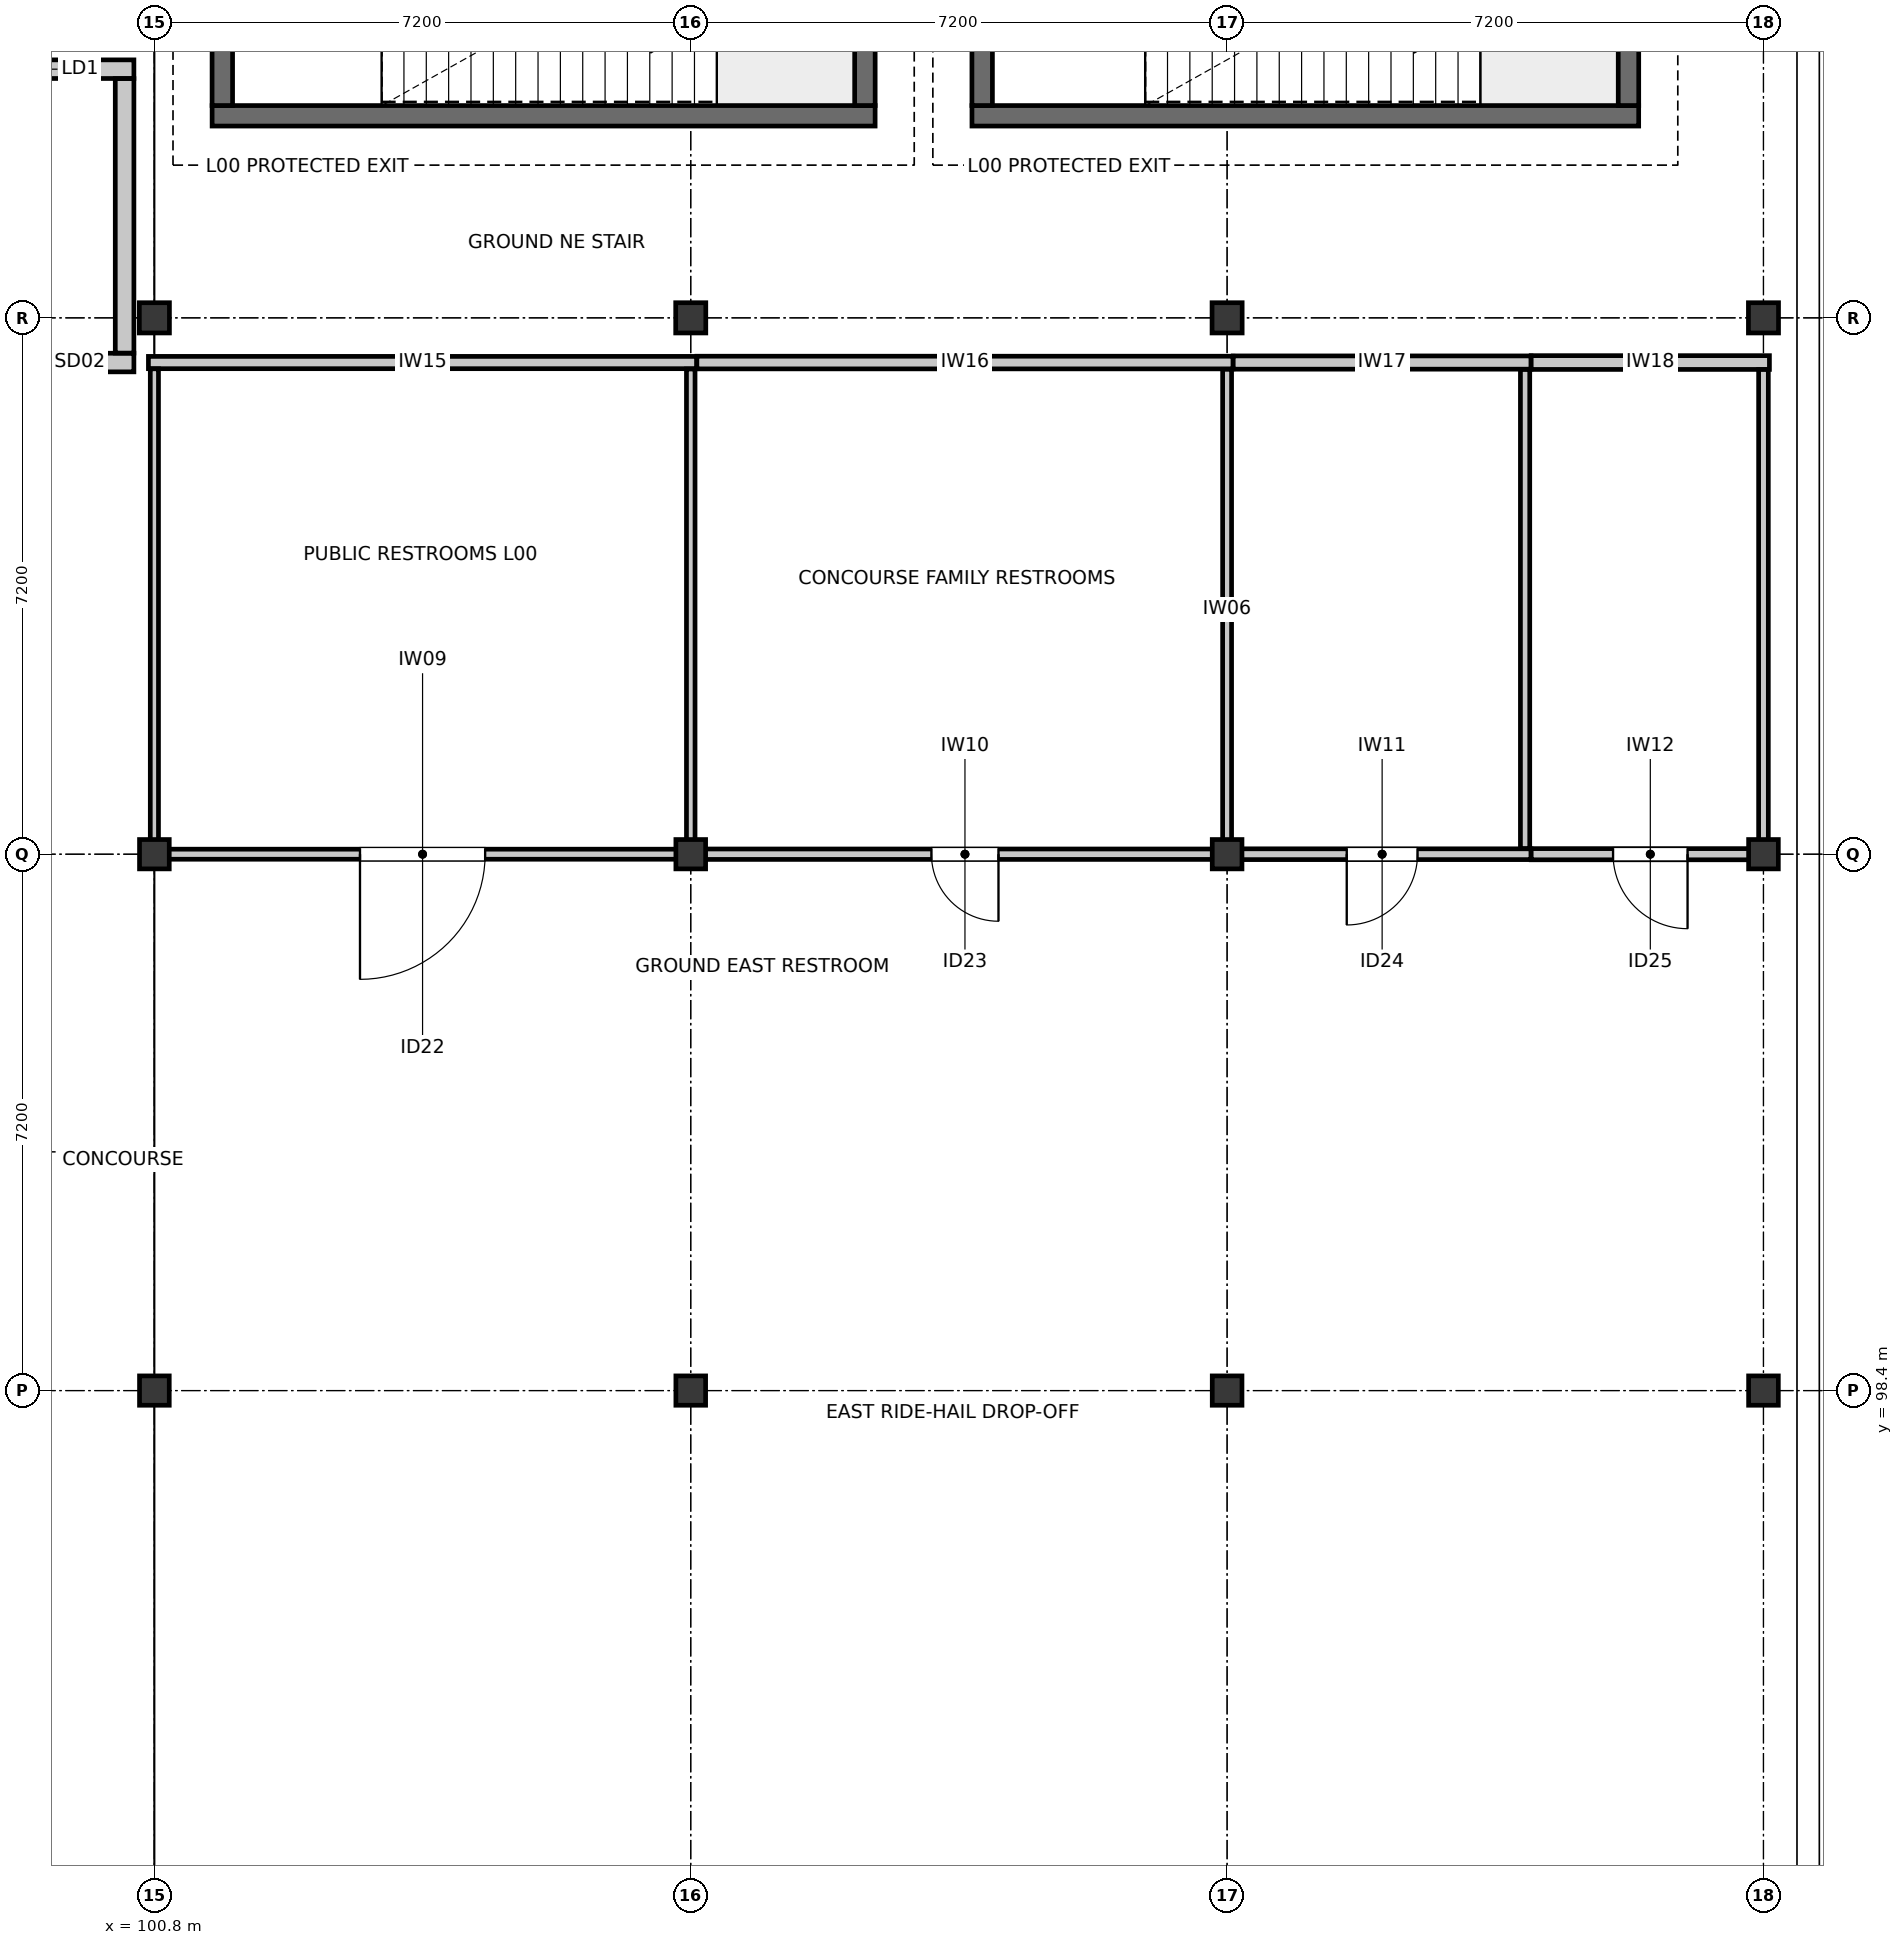
"""IFC4 building model, lengths in metres.
Left out: names, types, materials, properties, quantities, classifications, styles, units other than length and angle.
Written with IfcOpenShell. Run it as: python <this file> out.ifc"""

import sys

from ifc_helpers import new_model, si_unit, direction, frame, frame_2d, origin, origin_2d, place, context, subcontext, project, spatial, rectangle, i_section, extrude, element, fill, save


model = new_model("IFC4")
c1 = context("Model", 3, precision=1e-05, world=origin(), true_north=direction((0.0, 1.0)))
c2 = subcontext(c1, "Body", "Model", "MODEL_VIEW")
j1 = project(units=[si_unit("LENGTHUNIT", "METRE"), si_unit("PLANEANGLEUNIT", "RADIAN")], contexts=[c1])
p1 = place(None, origin())
s1 = spatial("IfcSite", under=j1, at=p1, CompositionType="ELEMENT")
p2 = place(p1, origin())
s2 = spatial("IfcBuilding", under=s1, at=p2, CompositionType="ELEMENT")
p3 = place(p2, origin())
s3 = spatial("IfcBuildingStorey", under=s2, at=p3, CompositionType="ELEMENT", Elevation=0.0)
for number, where, z_axis, x_axis in (
    (1, (100.8, 98.4, 0.0), (0.0, 0.0, 1.0), (1.0, 0.0, 0.0)),
    (2, (100.8, 105.6, 0.0), (0.0, 0.0, 1.0), (1.0, 0.0, 0.0)),
):
    element("IfcColumn", number, at=place(p3, frame(where, z_axis=z_axis, x_axis=x_axis)), inside=s3, PredefinedType="COLUMN", context=c2, shape_type="SweptSolid", body=[
        extrude(i_section(OverallWidth=0.399, OverallDepth=0.394, WebThickness=0.023, FlangeThickness=0.037, FilletRadius=0.015, at=origin_2d()), origin(), (0.0, 0.0, 1.0), 5.4),
    ])
p4 = place(p3, frame((100.8, 112.8, 0.0), z_axis=(0.0, 0.0, 1.0), x_axis=(1.0, 0.0, 0.0)))
e3 = element("IfcColumn", 3, at=p4, inside=s3, PredefinedType="COLUMN", context=c2, shape_type="SweptSolid", body=[
    extrude(i_section(OverallWidth=0.404, OverallDepth=0.406, WebThickness=0.027, FlangeThickness=0.044, FilletRadius=0.015, at=origin_2d()), origin(), (0.0, 0.0, 1.0), 5.4),
])
for number, where, z_axis, x_axis in (
    (4, (108.0, 98.4, 0.0), (0.0, 0.0, 1.0), (1.0, 0.0, 0.0)),
    (5, (108.0, 105.6, 0.0), (0.0, 0.0, 1.0), (1.0, 0.0, 0.0)),
):
    element("IfcColumn", number, at=place(p3, frame(where, z_axis=z_axis, x_axis=x_axis)), inside=s3, PredefinedType="COLUMN", context=c2, shape_type="SweptSolid", body=[
        extrude(i_section(OverallWidth=0.399, OverallDepth=0.394, WebThickness=0.023, FlangeThickness=0.037, FilletRadius=0.015, at=origin_2d()), origin(), (0.0, 0.0, 1.0), 5.4),
    ])
p5 = place(p3, frame((108.0, 112.8, 0.0), z_axis=(0.0, 0.0, 1.0), x_axis=(1.0, 0.0, 0.0)))
e6 = element("IfcColumn", 6, at=p5, inside=s3, PredefinedType="COLUMN", context=c2, shape_type="SweptSolid", body=[
    extrude(i_section(OverallWidth=0.404, OverallDepth=0.406, WebThickness=0.027, FlangeThickness=0.044, FilletRadius=0.015, at=origin_2d()), origin(), (0.0, 0.0, 1.0), 5.4),
])
for number, where, z_axis, x_axis in (
    (7, (115.2, 98.4, 0.0), (0.0, 0.0, 1.0), (1.0, 0.0, 0.0)),
    (8, (115.2, 105.6, 0.0), (0.0, 0.0, 1.0), (1.0, 0.0, 0.0)),
):
    element("IfcColumn", number, at=place(p3, frame(where, z_axis=z_axis, x_axis=x_axis)), inside=s3, PredefinedType="COLUMN", context=c2, shape_type="SweptSolid", body=[
        extrude(i_section(OverallWidth=0.399, OverallDepth=0.394, WebThickness=0.023, FlangeThickness=0.037, FilletRadius=0.015, at=origin_2d()), origin(), (0.0, 0.0, 1.0), 5.4),
    ])
p6 = place(p3, frame((115.2, 112.8, 0.0), z_axis=(0.0, 0.0, 1.0), x_axis=(1.0, 0.0, 0.0)))
e9 = element("IfcColumn", 9, at=p6, inside=s3, PredefinedType="COLUMN", context=c2, shape_type="SweptSolid", body=[
    extrude(i_section(OverallWidth=0.404, OverallDepth=0.406, WebThickness=0.027, FlangeThickness=0.044, FilletRadius=0.015, at=origin_2d()), origin(), (0.0, 0.0, 1.0), 5.4),
])
for number, where, z_axis, x_axis in (
    (10, (122.4, 98.4, 0.0), (0.0, 0.0, 1.0), (1.0, 0.0, 0.0)),
    (11, (122.4, 105.6, 0.0), (0.0, 0.0, 1.0), (1.0, 0.0, 0.0)),
):
    element("IfcColumn", number, at=place(p3, frame(where, z_axis=z_axis, x_axis=x_axis)), inside=s3, PredefinedType="COLUMN", context=c2, shape_type="SweptSolid", body=[
        extrude(i_section(OverallWidth=0.399, OverallDepth=0.394, WebThickness=0.023, FlangeThickness=0.037, FilletRadius=0.015, at=origin_2d()), origin(), (0.0, 0.0, 1.0), 5.4),
    ])
p7 = place(p3, frame((122.4, 112.8, 0.0), z_axis=(0.0, 0.0, 1.0), x_axis=(1.0, 0.0, 0.0)))
e12 = element("IfcColumn", 12, at=p7, inside=s3, PredefinedType="COLUMN", context=c2, shape_type="SweptSolid", body=[
    extrude(i_section(OverallWidth=0.404, OverallDepth=0.406, WebThickness=0.027, FlangeThickness=0.044, FilletRadius=0.015, at=origin_2d()), origin(), (0.0, 0.0, 1.0), 5.4),
])
p8 = place(p3, frame((110.475, 115.512, 0.0), z_axis=(0.0, 0.0, 1.0), x_axis=(-1.0, 0.0, 0.0)))
e13 = element("IfcWall", 13, at=p8, inside=s3, PredefinedType="SOLIDWALL", context=c2, shape_type="SweptSolid", body=[
    extrude(rectangle(XDim=8.9, YDim=0.275, at=frame_2d((4.45, 0.0))), origin(), (0.0, 0.0, 1.0), 5.16),
])
p9 = place(p3, frame((101.712, 115.65, 0.0), z_axis=(0.0, 0.0, 1.0), x_axis=(0.0, 1.0, 0.0)))
e14 = element("IfcWall", 14, at=p9, inside=s3, PredefinedType="SOLIDWALL", context=c2, shape_type="SweptSolid", body=[
    extrude(rectangle(XDim=3.56, YDim=0.275, at=frame_2d((1.78, 0.0))), origin(), (0.0, 0.0, 1.0), 5.16),
])
p10 = place(p9, frame((1.155, 0.0, 0.0)))
e15 = element("IfcOpeningElement", 15, at=p10, cuts=e14, PredefinedType="OPENING", context=c2, shape_type="SweptSolid", body=[
    extrude(rectangle(XDim=1.25, YDim=2.2, at=frame_2d((0.625, 1.1))), frame((0.0, 0.147, 0.0), z_axis=(0.0, -1.0, 0.0), x_axis=(1.0, 0.0, 0.0)), (0.0, 0.0, 1.0), 0.295),
])
p11 = place(p3, frame((110.338, 119.21, 0.0), z_axis=(0.0, 0.0, 1.0), x_axis=(0.0, -1.0, 0.0)))
e16 = element("IfcWall", 16, at=p11, inside=s3, PredefinedType="SOLIDWALL", context=c2, shape_type="SweptSolid", body=[
    extrude(rectangle(XDim=3.56, YDim=0.275, at=frame_2d((1.78, 0.0))), origin(), (0.0, 0.0, 1.0), 5.16),
])
p12 = place(p3, frame((120.725, 115.512, 0.0), z_axis=(0.0, 0.0, 1.0), x_axis=(-1.0, 0.0, 0.0)))
e17 = element("IfcWall", 17, at=p12, inside=s3, PredefinedType="SOLIDWALL", context=c2, shape_type="SweptSolid", body=[
    extrude(rectangle(XDim=8.95, YDim=0.275, at=frame_2d((4.475, 0.0))), origin(), (0.0, 0.0, 1.0), 5.16),
])
p13 = place(p3, frame((111.912, 115.65, 0.0), z_axis=(0.0, 0.0, 1.0), x_axis=(0.0, 1.0, 0.0)))
e18 = element("IfcWall", 18, at=p13, inside=s3, PredefinedType="SOLIDWALL", context=c2, shape_type="SweptSolid", body=[
    extrude(rectangle(XDim=3.56, YDim=0.275, at=frame_2d((1.78, 0.0))), origin(), (0.0, 0.0, 1.0), 5.16),
])
p14 = place(p13, frame((1.18, 0.0, 0.0)))
e19 = element("IfcOpeningElement", 19, at=p14, cuts=e18, PredefinedType="OPENING", context=c2, shape_type="SweptSolid", body=[
    extrude(rectangle(XDim=1.2, YDim=2.2, at=frame_2d((0.6, 1.1))), frame((0.0, 0.147, 0.0), z_axis=(0.0, -1.0, 0.0), x_axis=(1.0, 0.0, 0.0)), (0.0, 0.0, 1.0), 0.295),
])
p15 = place(p3, frame((120.588, 119.21, 0.0), z_axis=(0.0, 0.0, 1.0), x_axis=(0.0, -1.0, 0.0)))
e20 = element("IfcWall", 20, at=p15, inside=s3, PredefinedType="SOLIDWALL", context=c2, shape_type="SweptSolid", body=[
    extrude(rectangle(XDim=3.56, YDim=0.275, at=frame_2d((1.78, 0.0))), origin(), (0.0, 0.0, 1.0), 5.16),
])
p16 = place(p3, frame((100.525, 112.2, 0.0), z_axis=(0.0, 0.0, 1.0), x_axis=(-1.0, 0.0, 0.0)))
e21 = element("IfcWall", 21, at=p16, inside=s3, PredefinedType="PARTITIONING", context=c2, shape_type="SweptSolid", body=[
    extrude(rectangle(XDim=6.65, YDim=0.25, at=frame_2d((3.325, 0.0))), origin(), (0.0, 0.0, 1.0), 4.457),
])
p17 = place(p16, frame((2.7, 0.0, 0.0)))
e22 = element("IfcOpeningElement", 22, at=p17, cuts=e21, PredefinedType="OPENING", context=c2, shape_type="SweptSolid", body=[
    extrude(rectangle(XDim=1.25, YDim=2.2, at=frame_2d((0.625, 1.1))), frame((0.0, 0.135, 0.0), z_axis=(0.0, -1.0, 0.0), x_axis=(1.0, 0.0, 0.0)), (0.0, 0.0, 1.0), 0.27),
])
p18 = place(p3, frame((98.827, 116.138, 0.0), z_axis=(0.0, 0.0, 1.0), x_axis=(1.0, 0.0, 0.0)))
e23 = element("IfcWall", 23, at=p18, inside=s3, PredefinedType="PARTITIONING", context=c2, shape_type="SweptSolid", body=[
    extrude(rectangle(XDim=1.698, YDim=0.25, at=frame_2d((0.849, 0.0))), origin(), (0.0, 0.0, 1.0), 4.457),
])
p19 = place(p3, frame((100.4, 116.011, 0.0), z_axis=(0.0, 0.0, 1.0), x_axis=(0.0, -1.0, 0.0)))
e24 = element("IfcWall", 24, at=p19, inside=s3, PredefinedType="PARTITIONING", context=c2, shape_type="SweptSolid", body=[
    extrude(rectangle(XDim=3.684, YDim=0.25, at=frame_2d((1.842, 0.0))), origin(), (0.0, 0.0, 1.0), 4.457),
])
p20 = place(p3, frame((108.08, 105.6, 0.0), z_axis=(0.0, 0.0, 1.0), x_axis=(-1.0, 0.0, 0.0)))
e25 = element("IfcWall", 25, at=p20, inside=s3, PredefinedType="PARTITIONING", context=c2, shape_type="SweptSolid", body=[
    extrude(rectangle(XDim=7.36, YDim=0.135, at=frame_2d((3.68, 0.0))), origin(), (0.0, 0.0, 1.0), 4.457),
])
p21 = place(p20, frame((2.84, 0.0, 0.0)))
e26 = element("IfcOpeningElement", 26, at=p21, cuts=e25, PredefinedType="OPENING", context=c2, shape_type="SweptSolid", body=[
    extrude(rectangle(XDim=1.68, YDim=2.16, at=frame_2d((0.84, 1.08))), frame((0.0, 0.077, 0.0), z_axis=(0.0, -1.0, 0.0), x_axis=(1.0, 0.0, 0.0)), (0.0, 0.0, 1.0), 0.155),
])
p22 = place(p3, frame((115.28, 105.6, 0.0), z_axis=(0.0, 0.0, 1.0), x_axis=(-1.0, 0.0, 0.0)))
e27 = element("IfcWall", 27, at=p22, inside=s3, PredefinedType="PARTITIONING", context=c2, shape_type="SweptSolid", body=[
    extrude(rectangle(XDim=7.198, YDim=0.14, at=frame_2d((3.599, 0.0))), origin(), (0.0, 0.0, 1.0), 4.457),
])
p23 = place(p22, frame((3.149, 0.0, 0.0)))
e28 = element("IfcOpeningElement", 28, at=p23, cuts=e27, PredefinedType="OPENING", context=c2, shape_type="SweptSolid", body=[
    extrude(rectangle(XDim=0.9, YDim=2.22, at=frame_2d((0.45, 1.11))), frame((0.0, 0.08, 0.0), z_axis=(0.0, -1.0, 0.0), x_axis=(1.0, 0.0, 0.0)), (0.0, 0.0, 1.0), 0.16),
])
p24 = place(p3, frame((119.28, 105.6, 0.0), z_axis=(0.0, 0.0, 1.0), x_axis=(-1.0, 0.0, 0.0)))
e29 = element("IfcWall", 29, at=p24, inside=s3, PredefinedType="PARTITIONING", context=c2, shape_type="SweptSolid", body=[
    extrude(rectangle(XDim=3.998, YDim=0.145, at=frame_2d((1.999, 0.0))), origin(), (0.0, 0.0, 1.0), 4.457),
])
p25 = place(p24, frame((1.524, 0.0, 0.0)))
e30 = element("IfcOpeningElement", 30, at=p25, cuts=e29, PredefinedType="OPENING", context=c2, shape_type="SweptSolid", body=[
    extrude(rectangle(XDim=0.95, YDim=2.22, at=frame_2d((0.475, 1.11))), frame((0.0, 0.083, 0.0), z_axis=(0.0, -1.0, 0.0), x_axis=(1.0, 0.0, 0.0)), (0.0, 0.0, 1.0), 0.165),
])
p26 = place(p3, frame((122.48, 105.6, 0.0), z_axis=(0.0, 0.0, 1.0), x_axis=(-1.0, 0.0, 0.0)))
e31 = element("IfcWall", 31, at=p26, inside=s3, PredefinedType="PARTITIONING", context=c2, shape_type="SweptSolid", body=[
    extrude(rectangle(XDim=3.198, YDim=0.15, at=frame_2d((1.599, 0.0))), origin(), (0.0, 0.0, 1.0), 4.457),
])
p27 = place(p26, frame((1.099, 0.0, 0.0)))
e32 = element("IfcOpeningElement", 32, at=p27, cuts=e31, PredefinedType="OPENING", context=c2, shape_type="SweptSolid", body=[
    extrude(rectangle(XDim=1.0, YDim=2.22, at=frame_2d((0.5, 1.11))), frame((0.0, 0.085, 0.0), z_axis=(0.0, -1.0, 0.0), x_axis=(1.0, 0.0, 0.0)), (0.0, 0.0, 1.0), 0.17),
])
p28 = place(p3, frame((100.72, 112.2, 0.0), z_axis=(0.0, 0.0, 1.0), x_axis=(1.0, 0.0, 0.0)))
e33 = element("IfcWall", 33, at=p28, inside=s3, PredefinedType="PARTITIONING", context=c2, shape_type="SweptSolid", body=[
    extrude(rectangle(XDim=7.36, YDim=0.165, at=frame_2d((3.68, 0.0))), origin(), (0.0, 0.0, 1.0), 4.457),
])
p29 = place(p3, frame((108.082, 112.2, 0.0), z_axis=(0.0, 0.0, 1.0), x_axis=(1.0, 0.0, 0.0)))
e34 = element("IfcWall", 34, at=p29, inside=s3, PredefinedType="PARTITIONING", context=c2, shape_type="SweptSolid", body=[
    extrude(rectangle(XDim=7.198, YDim=0.17, at=frame_2d((3.599, 0.0))), origin(), (0.0, 0.0, 1.0), 4.457),
])
p30 = place(p3, frame((115.282, 112.2, 0.0), z_axis=(0.0, 0.0, 1.0), x_axis=(1.0, 0.0, 0.0)))
e35 = element("IfcWall", 35, at=p30, inside=s3, PredefinedType="PARTITIONING", context=c2, shape_type="SweptSolid", body=[
    extrude(rectangle(XDim=3.998, YDim=0.178, at=frame_2d((1.999, 0.0))), origin(), (0.0, 0.0, 1.0), 4.457),
])
p31 = place(p3, frame((119.282, 112.2, 0.0), z_axis=(0.0, 0.0, 1.0), x_axis=(1.0, 0.0, 0.0)))
e36 = element("IfcWall", 36, at=p31, inside=s3, PredefinedType="PARTITIONING", context=c2, shape_type="SweptSolid", body=[
    extrude(rectangle(XDim=3.198, YDim=0.185, at=frame_2d((1.599, 0.0))), origin(), (0.0, 0.0, 1.0), 4.457),
])
p32 = place(p3, frame((100.8, 105.67, 0.0), z_axis=(0.0, 0.0, 1.0), x_axis=(0.0, 1.0, 0.0)))
e37 = element("IfcWall", 37, at=p32, inside=s3, PredefinedType="PARTITIONING", context=c2, shape_type="SweptSolid", body=[
    extrude(rectangle(XDim=6.446, YDim=0.11, at=frame_2d((3.223, 0.0))), origin(), (0.0, 0.0, 1.0), 4.457),
])
p33 = place(p3, frame((108.0, 112.113, 0.0), z_axis=(0.0, 0.0, 1.0), x_axis=(0.0, -1.0, 0.0)))
e38 = element("IfcWall", 38, at=p33, inside=s3, PredefinedType="PARTITIONING", context=c2, shape_type="SweptSolid", body=[
    extrude(rectangle(XDim=6.441, YDim=0.115, at=frame_2d((3.22, 0.0))), origin(), (0.0, 0.0, 1.0), 4.457),
])
p34 = place(p3, frame((115.2, 112.109, 0.0), z_axis=(0.0, 0.0, 1.0), x_axis=(0.0, -1.0, 0.0)))
e39 = element("IfcWall", 39, at=p34, inside=s3, PredefinedType="PARTITIONING", context=c2, shape_type="SweptSolid", body=[
    extrude(rectangle(XDim=6.435, YDim=0.12, at=frame_2d((3.217, 0.0))), origin(), (0.0, 0.0, 1.0), 4.457),
])
p35 = place(p3, frame((119.2, 112.106, 0.0), z_axis=(0.0, 0.0, 1.0), x_axis=(0.0, -1.0, 0.0)))
e40 = element("IfcWall", 40, at=p35, inside=s3, PredefinedType="PARTITIONING", context=c2, shape_type="SweptSolid", body=[
    extrude(rectangle(XDim=6.429, YDim=0.125, at=frame_2d((3.214, 0.0))), origin(), (0.0, 0.0, 1.0), 4.457),
])
p36 = place(p3, frame((122.4, 112.106, 0.0), z_axis=(0.0, 0.0, 1.0), x_axis=(0.0, -1.0, 0.0)))
e41 = element("IfcWall", 41, at=p36, inside=s3, PredefinedType="PARTITIONING", context=c2, shape_type="SweptSolid", body=[
    extrude(rectangle(XDim=6.429, YDim=0.13, at=frame_2d((3.214, 0.0))), origin(), (0.0, 0.0, 1.0), 4.457),
])
p37 = place(p21, origin())
e42 = element("IfcDoor", 42, at=p37, inside=s3, OperationType="SINGLE_SWING_RIGHT", PredefinedType="DOOR", context=c2, shape_type="SweptSolid", body=[
    extrude(rectangle(XDim=1.68, YDim=2.16, at=frame_2d((0.84, 1.08))), frame((0.0, 0.025, 0.0), z_axis=(0.0, -1.0, 0.0), x_axis=(1.0, 0.0, 0.0)), (0.0, 0.0, 1.0), 0.05),
])
fill(e26, e42)
p38 = place(p23, origin())
e43 = element("IfcDoor", 43, at=p38, inside=s3, OperationType="SINGLE_SWING_LEFT", PredefinedType="DOOR", context=c2, shape_type="SweptSolid", body=[
    extrude(rectangle(XDim=0.9, YDim=2.22, at=frame_2d((0.45, 1.11))), frame((0.0, 0.025, 0.0), z_axis=(0.0, -1.0, 0.0), x_axis=(1.0, 0.0, 0.0)), (0.0, 0.0, 1.0), 0.05),
])
fill(e28, e43)
p39 = place(p25, origin())
e44 = element("IfcDoor", 44, at=p39, inside=s3, OperationType="SINGLE_SWING_RIGHT", PredefinedType="DOOR", context=c2, shape_type="SweptSolid", body=[
    extrude(rectangle(XDim=0.95, YDim=2.22, at=frame_2d((0.475, 1.11))), frame((0.0, 0.025, 0.0), z_axis=(0.0, -1.0, 0.0), x_axis=(1.0, 0.0, 0.0)), (0.0, 0.0, 1.0), 0.05),
])
fill(e30, e44)
p40 = place(p27, origin())
e45 = element("IfcDoor", 45, at=p40, inside=s3, OperationType="SINGLE_SWING_LEFT", PredefinedType="DOOR", context=c2, shape_type="SweptSolid", body=[
    extrude(rectangle(XDim=1.0, YDim=2.22, at=frame_2d((0.5, 1.11))), frame((0.0, 0.025, 0.0), z_axis=(0.0, -1.0, 0.0), x_axis=(1.0, 0.0, 0.0)), (0.0, 0.0, 1.0), 0.05),
])
fill(e32, e45)
save(model, sys.argv[1])
